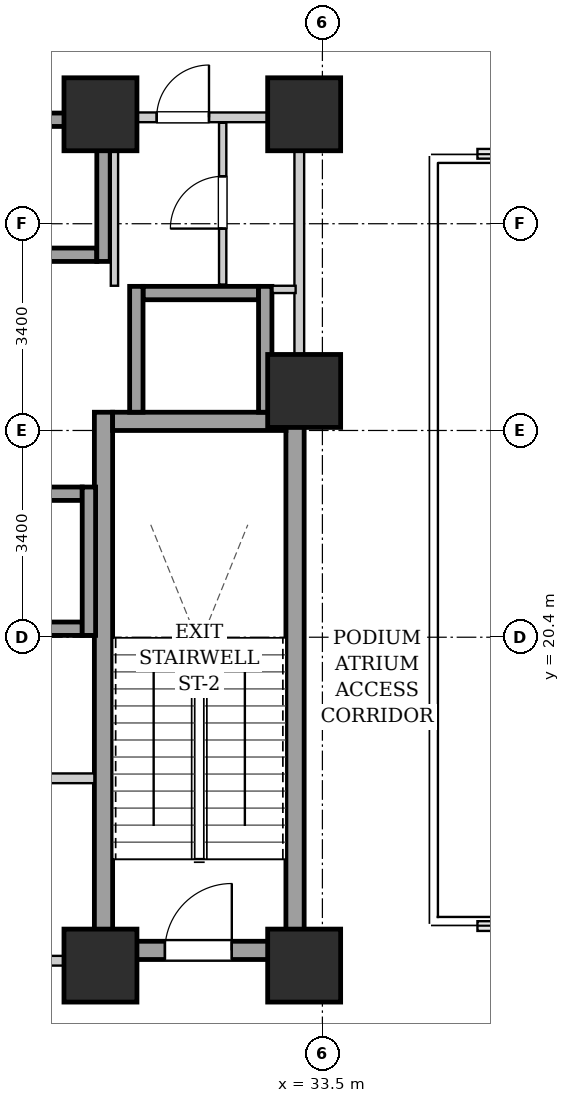
"""IFC4 building model, lengths in metres.
Left out: names, types, materials, properties, quantities, classifications, styles, units other than length and angle.
Written with IfcOpenShell. Run it as: python <this file> out.ifc"""

import sys

from ifc_helpers import new_model, si_unit, direction, frame, frame_2d, origin, origin_2d, place, context, subcontext, project, spatial, rectangle, extrude, element, fill, save


model = new_model("IFC4")
c1 = context("Model", 3, precision=1e-05, world=origin(), true_north=direction((0.0, 1.0)))
c2 = subcontext(c1, "Body", "Model", "MODEL_VIEW")
j1 = project(units=[si_unit("LENGTHUNIT", "METRE"), si_unit("PLANEANGLEUNIT", "RADIAN")], contexts=[c1])
p1 = place(None, origin())
s1 = spatial("IfcSite", under=j1, at=p1, CompositionType="ELEMENT")
p2 = place(p1, origin())
s2 = spatial("IfcBuilding", under=s1, at=p2, CompositionType="ELEMENT")
p3 = place(p2, frame((0.0, 0.0, 11.2)))
s3 = spatial("IfcBuildingStorey", under=s2, at=p3, CompositionType="ELEMENT", Elevation=11.2)
for number, where, z_axis, x_axis in (
    (1, (29.85, 15.0, 0.0), (0.0, 0.0, 1.0), (1.0, 0.0, 0.0)),
    (2, (33.2, 15.0, 0.0), (0.0, 0.0, 1.0), (1.0, 0.0, 0.0)),
    (3, (29.85, 29.0, 0.0), (0.0, 0.0, 1.0), (1.0, 0.0, 0.0)),
    (4, (33.2, 29.0, 0.0), (0.0, 0.0, 1.0), (1.0, 0.0, 0.0)),
    (5, (33.2, 24.45, 0.0), (0.0, 0.0, 1.0), (1.0, 0.0, 0.0)),
):
    element("IfcColumn", number, at=place(p3, frame(where, z_axis=z_axis, x_axis=x_axis)), inside=s3, PredefinedType="COLUMN", context=c2, shape_type="SweptSolid", body=[
        extrude(rectangle(XDim=1.2, YDim=1.2, at=origin_2d()), origin(), (0.0, 0.0, 1.0), 4.8),
    ])
for number, where, z_axis, x_axis in (
    (6, (29.9, 15.1, 0.0), (0.0, 0.0, 1.0), (0.0, 1.0, 0.0)),
    (7, (33.05, 15.1, 0.0), (0.0, 0.0, 1.0), (0.0, 1.0, 0.0)),
):
    element("IfcWall", number, at=place(p3, frame(where, z_axis=z_axis, x_axis=x_axis)), inside=s3, PredefinedType="SHEAR", context=c2, shape_type="SweptSolid", body=[
        extrude(rectangle(XDim=9.0, YDim=0.3, at=frame_2d((4.5, 0.0))), origin(), (0.0, 0.0, 1.0), 4.48),
    ])
p4 = place(p3, frame((30.05, 23.95, 0.0), z_axis=(0.0, 0.0, 1.0), x_axis=(1.0, 0.0, 0.0)))
e8 = element("IfcWall", 8, at=p4, inside=s3, PredefinedType="SHEAR", context=c2, shape_type="SweptSolid", body=[
    extrude(rectangle(XDim=2.85, YDim=0.3, at=frame_2d((1.425, 0.0))), origin(), (0.0, 0.0, 1.0), 4.48),
])
p5 = place(p3, frame((30.05, 15.25, 0.0), z_axis=(0.0, 0.0, 1.0), x_axis=(1.0, 0.0, 0.0)))
e9 = element("IfcWall", 9, at=p5, inside=s3, PredefinedType="SHEAR", context=c2, shape_type="SweptSolid", body=[
    extrude(rectangle(XDim=2.85, YDim=0.3, at=frame_2d((1.425, 0.0))), origin(), (0.0, 0.0, 1.0), 4.48),
])
p6 = place(p5, frame((0.86, 0.0, 0.0)))
e10 = element("IfcOpeningElement", 10, at=p6, cuts=e9, PredefinedType="OPENING", context=c2, shape_type="SweptSolid", body=[
    extrude(rectangle(XDim=1.1, YDim=2.05, at=frame_2d((0.55, 1.025))), frame((0.0, 0.16, 0.0), z_axis=(0.0, -1.0, 0.0), x_axis=(1.0, 0.0, 0.0)), (0.0, 0.0, 1.0), 0.32),
])
for number, where, z_axis, x_axis in (
    (11, (27.93, 26.69, 0.0), (0.0, 0.0, 1.0), (1.0, 0.0, 0.0)),
    (12, (27.93, 28.91, 0.0), (0.0, 0.0, 1.0), (1.0, 0.0, 0.0)),
):
    element("IfcWall", number, at=place(p3, frame(where, z_axis=z_axis, x_axis=x_axis)), inside=s3, PredefinedType="SHEAR", context=c2, shape_type="SweptSolid", body=[
        extrude(rectangle(XDim=1.86, YDim=0.22, at=frame_2d((0.93, 0.0))), origin(), (0.0, 0.0, 1.0), 4.48),
    ])
p7 = place(p3, frame((29.9, 26.58, 0.0), z_axis=(0.0, 0.0, 1.0), x_axis=(0.0, 1.0, 0.0)))
e13 = element("IfcWall", 13, at=p7, inside=s3, PredefinedType="SHEAR", context=c2, shape_type="SweptSolid", body=[
    extrude(rectangle(XDim=2.44, YDim=0.22, at=frame_2d((1.22, 0.0))), origin(), (0.0, 0.0, 1.0), 4.48),
])
for number, where, z_axis, x_axis in (
    (14, (27.65, 20.54, 0.0), (0.0, 0.0, 1.0), (1.0, 0.0, 0.0)),
    (15, (27.65, 22.76, 0.0), (0.0, 0.0, 1.0), (1.0, 0.0, 0.0)),
):
    element("IfcWall", number, at=place(p3, frame(where, z_axis=z_axis, x_axis=x_axis)), inside=s3, PredefinedType="SHEAR", context=c2, shape_type="SweptSolid", body=[
        extrude(rectangle(XDim=1.9, YDim=0.22, at=frame_2d((0.95, 0.0))), origin(), (0.0, 0.0, 1.0), 4.48),
    ])
p8 = place(p3, frame((29.66, 20.43, 0.0), z_axis=(0.0, 0.0, 1.0), x_axis=(0.0, 1.0, 0.0)))
e16 = element("IfcWall", 16, at=p8, inside=s3, PredefinedType="SHEAR", context=c2, shape_type="SweptSolid", body=[
    extrude(rectangle(XDim=2.44, YDim=0.22, at=frame_2d((1.22, 0.0))), origin(), (0.0, 0.0, 1.0), 4.48),
])
p9 = place(p3, frame((30.55, 26.06, 0.0), z_axis=(0.0, 0.0, 1.0), x_axis=(1.0, 0.0, 0.0)))
e17 = element("IfcWall", 17, at=p9, inside=s3, PredefinedType="SHEAR", context=c2, shape_type="SweptSolid", body=[
    extrude(rectangle(XDim=1.9, YDim=0.22, at=frame_2d((0.95, 0.0))), origin(), (0.0, 0.0, 1.0), 4.48),
])
for number, where, z_axis, x_axis in (
    (18, (30.44, 24.1, 0.0), (0.0, 0.0, 1.0), (0.0, 1.0, 0.0)),
    (19, (32.56, 24.1, 0.0), (0.0, 0.0, 1.0), (0.0, 1.0, 0.0)),
):
    element("IfcWall", number, at=place(p3, frame(where, z_axis=z_axis, x_axis=x_axis)), inside=s3, PredefinedType="SHEAR", context=c2, shape_type="SweptSolid", body=[
        extrude(rectangle(XDim=2.07, YDim=0.22, at=frame_2d((1.035, 0.0))), origin(), (0.0, 0.0, 1.0), 4.48),
    ])
p10 = place(p3, frame((21.25, 15.08, 0.0), z_axis=(0.0, 0.0, 1.0), x_axis=(1.0, 0.0, 0.0)))
e20 = element("IfcWall", 20, at=p10, inside=s3, PredefinedType="PARTITIONING", context=c2, shape_type="SweptSolid", body=[
    extrude(rectangle(XDim=8.5, YDim=0.16, at=frame_2d((4.25, 0.0))), origin(), (0.0, 0.0, 1.0), 4.48),
])
p11 = place(p10, frame((3.725, 0.0, 0.0)))
e21 = element("IfcOpeningElement", 21, at=p11, cuts=e20, PredefinedType="OPENING", context=c2, shape_type="SweptSolid", body=[
    extrude(rectangle(XDim=1.05, YDim=2.05, at=frame_2d((0.525, 1.025))), frame((0.0, 0.09, 0.0), z_axis=(0.0, -1.0, 0.0), x_axis=(1.0, 0.0, 0.0)), (0.0, 0.0, 1.0), 0.18),
])
p12 = place(p3, frame((28.65, 18.08, 0.0), z_axis=(0.0, 0.0, 1.0), x_axis=(1.0, 0.0, 0.0)))
e22 = element("IfcWall", 22, at=p12, inside=s3, PredefinedType="PARTITIONING", context=c2, shape_type="SweptSolid", body=[
    extrude(rectangle(XDim=1.1, YDim=0.16, at=frame_2d((0.55, 0.0))), origin(), (0.0, 0.0, 1.0), 4.48),
])
p13 = place(p3, frame((33.12, 24.12, 0.0), z_axis=(0.0, 0.0, 1.0), x_axis=(0.0, 1.0, 0.0)))
e23 = element("IfcWall", 23, at=p13, inside=s3, PredefinedType="PARTITIONING", context=c2, shape_type="SweptSolid", body=[
    extrude(rectangle(XDim=4.76, YDim=0.16, at=frame_2d((2.38, 0.0))), origin(), (0.0, 0.0, 1.0), 4.48),
])
p14 = place(p3, frame((30.08, 26.18, 0.0), z_axis=(0.0, 0.0, 1.0), x_axis=(0.0, 1.0, 0.0)))
e24 = element("IfcWall", 24, at=p14, inside=s3, PredefinedType="PARTITIONING", context=c2, shape_type="SweptSolid", body=[
    extrude(rectangle(XDim=2.68, YDim=0.12, at=frame_2d((1.34, 0.0))), origin(), (0.0, 0.0, 1.0), 4.48),
])
p15 = place(p3, frame((32.68, 26.12, 0.0), z_axis=(0.0, 0.0, 1.0), x_axis=(1.0, 0.0, 0.0)))
e25 = element("IfcWall", 25, at=p15, inside=s3, PredefinedType="PARTITIONING", context=c2, shape_type="SweptSolid", body=[
    extrude(rectangle(XDim=0.38, YDim=0.12, at=frame_2d((0.19, 0.0))), origin(), (0.0, 0.0, 1.0), 4.48),
])
p16 = place(p3, frame((31.86, 26.2, 0.0), z_axis=(0.0, 0.0, 1.0), x_axis=(0.0, 1.0, 0.0)))
e26 = element("IfcWall", 26, at=p16, inside=s3, PredefinedType="PARTITIONING", context=c2, shape_type="SweptSolid", body=[
    extrude(rectangle(XDim=2.66, YDim=0.12, at=frame_2d((1.33, 0.0))), origin(), (0.0, 0.0, 1.0), 4.48),
])
p17 = place(p16, frame((0.92, 0.0, 0.0)))
e27 = element("IfcOpeningElement", 27, at=p17, cuts=e26, PredefinedType="OPENING", context=c2, shape_type="SweptSolid", body=[
    extrude(rectangle(XDim=0.86, YDim=2.05, at=frame_2d((0.43, 1.025))), frame((0.0, 0.07, 0.0), z_axis=(0.0, -1.0, 0.0), x_axis=(1.0, 0.0, 0.0)), (0.0, 0.0, 1.0), 0.14),
])
p18 = place(p3, frame((30.08, 28.95, 0.0), z_axis=(0.0, 0.0, 1.0), x_axis=(1.0, 0.0, 0.0)))
e28 = element("IfcWall", 28, at=p18, inside=s3, PredefinedType="PARTITIONING", context=c2, shape_type="SweptSolid", body=[
    extrude(rectangle(XDim=2.96, YDim=0.16, at=frame_2d((1.48, 0.0))), origin(), (0.0, 0.0, 1.0), 4.48),
])
p19 = place(p18, frame((0.695, 0.0, 0.0)))
e29 = element("IfcOpeningElement", 29, at=p19, cuts=e28, PredefinedType="OPENING", context=c2, shape_type="SweptSolid", body=[
    extrude(rectangle(XDim=0.86, YDim=2.05, at=frame_2d((0.43, 1.025))), frame((0.0, 0.09, 0.0), z_axis=(0.0, -1.0, 0.0), x_axis=(1.0, 0.0, 0.0)), (0.0, 0.0, 1.0), 0.18),
])
p20 = place(p6, origin())
e30 = element("IfcDoor", 30, at=p20, inside=s3, OperationType="SINGLE_SWING_RIGHT", PredefinedType="DOOR", context=c2, shape_type="SweptSolid", body=[
    extrude(rectangle(XDim=1.1, YDim=2.05, at=frame_2d((0.55, 1.025))), frame((0.0, 0.025, 0.0), z_axis=(0.0, -1.0, 0.0), x_axis=(1.0, 0.0, 0.0)), (0.0, 0.0, 1.0), 0.05),
])
fill(e10, e30)
p21 = place(p17, origin())
e31 = element("IfcDoor", 31, at=p21, inside=s3, OperationType="SINGLE_SWING_LEFT", PredefinedType="DOOR", context=c2, shape_type="SweptSolid", body=[
    extrude(rectangle(XDim=0.86, YDim=2.05, at=frame_2d((0.43, 1.025))), frame((0.0, 0.025, 0.0), z_axis=(0.0, -1.0, 0.0), x_axis=(1.0, 0.0, 0.0)), (0.0, 0.0, 1.0), 0.05),
])
fill(e27, e31)
p22 = place(p19, origin())
e32 = element("IfcDoor", 32, at=p22, inside=s3, OperationType="SINGLE_SWING_RIGHT", PredefinedType="DOOR", context=c2, shape_type="SweptSolid", body=[
    extrude(rectangle(XDim=0.86, YDim=2.05, at=frame_2d((0.43, 1.025))), frame((0.0, 0.025, 0.0), z_axis=(0.0, -1.0, 0.0), x_axis=(1.0, 0.0, 0.0)), (0.0, 0.0, 1.0), 0.05),
])
fill(e29, e32)
save(model, sys.argv[1])
